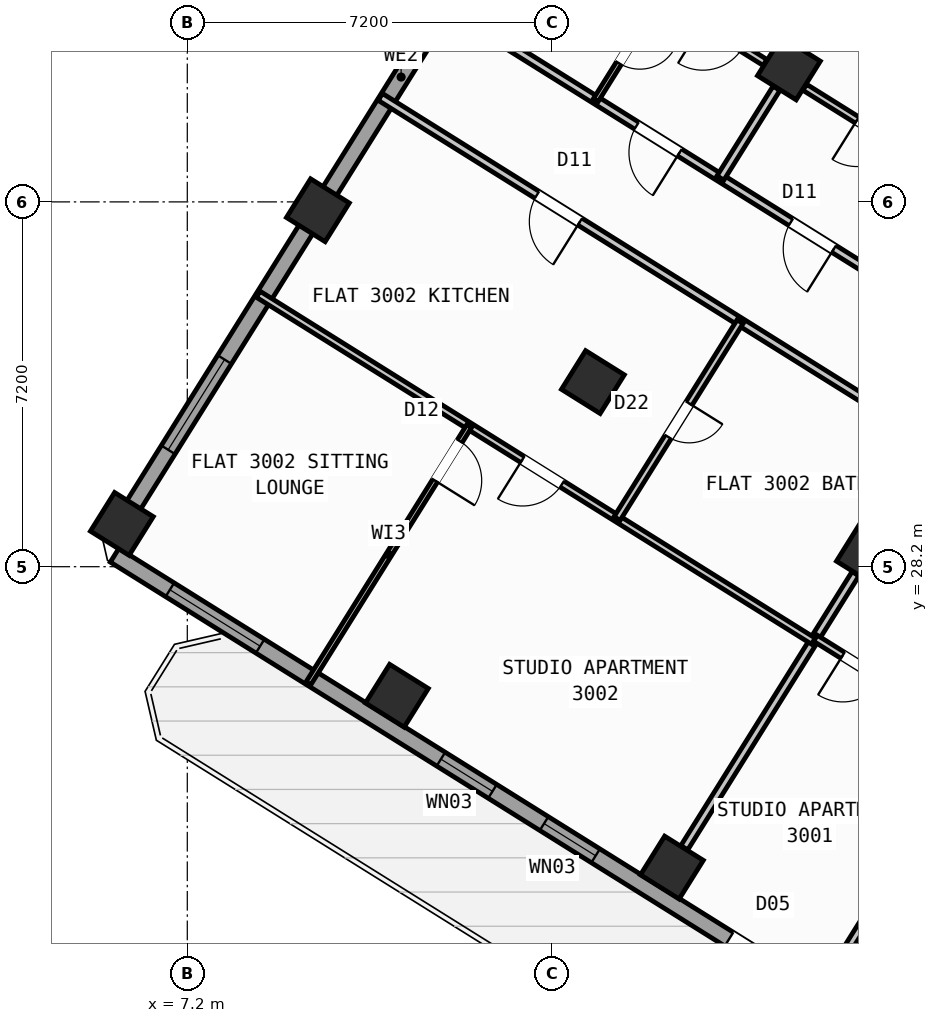
"""IFC4 building model, lengths in metres.
Left out: names, types, materials, properties, quantities, classifications, styles, units other than length and angle.
Written with IfcOpenShell. Run it as: python <this file> out.ifc"""

import sys

from ifc_helpers import new_model, si_unit, direction, frame, frame_2d, origin, origin_2d, place, context, subcontext, project, spatial, rectangle, hollow_rectangle, extrude, source, transform, mapped, element, fill, save


model = new_model("IFC4")
c1 = context("Model", 3, precision=1e-05, world=origin(), true_north=direction((0.0, 1.0)))
c2 = subcontext(c1, "Body", "Model", "MODEL_VIEW")
j1 = project(units=[si_unit("LENGTHUNIT", "METRE"), si_unit("PLANEANGLEUNIT", "RADIAN")], contexts=[c1])
p1 = place(None, origin())
s1 = spatial("IfcSite", under=j1, at=p1, CompositionType="ELEMENT")
p2 = place(p1, origin())
s2 = spatial("IfcBuilding", under=s1, at=p2, CompositionType="ELEMENT")
p3 = place(p2, frame((0.0, 0.0, 119.7)))
s3 = spatial("IfcBuildingStorey", under=s2, at=p3, CompositionType="ELEMENT", Elevation=119.7)
m1 = source(origin(), c2, "Body", "SweptSolid", [
    extrude(hollow_rectangle(XDim=0.9, YDim=0.9, WallThickness=0.036, at=origin_2d()), origin(), (0.0, 0.0, 1.0), 3.6),
])
for number, where, z_axis, x_axis in (
    (1, (20.632, 28.452, 0.0), (0.0, 0.0, 1.0), (-0.848, 0.53, 0.0)),
    (2, (16.764, 22.261, 0.0), (0.0, 0.0, 1.0), (-0.848, 0.53, 0.0)),
    (3, (19.073, 38.034, 0.0), (0.0, 0.0, 1.0), (-0.848, 0.53, 0.0)),
    (4, (15.205, 31.844, 0.0), (0.0, 0.0, 1.0), (-0.848, 0.53, 0.0)),
    (5, (11.336, 25.653, 0.0), (0.0, 0.0, 1.0), (-0.848, 0.53, 0.0)),
    (6, (9.777, 35.235, 0.0), (0.0, 0.0, 1.0), (-0.848, 0.53, 0.0)),
    (7, (5.909, 29.044, 0.0), (0.0, 0.0, 1.0), (-0.848, 0.53, 0.0)),
):
    element("IfcColumn", number, at=place(p3, frame(where, z_axis=z_axis, x_axis=x_axis)), inside=s3, PredefinedType="COLUMN", context=c2, shape_type="MappedRepresentation", body=[
        mapped(m1, transform((0.0, 0.0, 0.0), scale=1.0)),
    ])
p4 = place(p3, frame((31.76, 12.183, 0.0), z_axis=(0.0, 0.0, 1.0), x_axis=(-0.848047074256, 0.529920899612, 0.0)))
e8 = element("IfcWall", 8, at=p4, inside=s3, PredefinedType="STANDARD", context=c2, shape_type="SweptSolid", body=[
    extrude(rectangle(XDim=30.652, YDim=0.32, at=frame_2d((15.326, 0.0))), origin(), (0.0, 0.0, 1.0), 3.35),
])
p5 = place(p4, frame((15.153, 0.0, 0.0)))
e9 = element("IfcOpeningElement", 9, at=p5, cuts=e8, PredefinedType="OPENING", context=c2, shape_type="SweptSolid", body=[
    extrude(rectangle(XDim=1.2, YDim=2.15, at=frame_2d((0.6, 1.075))), frame((0.0, 0.17, 0.0), z_axis=(0.0, -1.0, 0.0), x_axis=(1.0, 0.0, 0.0)), (0.0, 0.0, 1.0), 0.34),
])
p6 = place(p4, frame((2.002, 0.0, 0.8)))
e10 = element("IfcOpeningElement", 10, at=p6, cuts=e8, PredefinedType="OPENING", context=c2, shape_type="SweptSolid", body=[
    extrude(rectangle(XDim=2.1, YDim=1.55, at=frame_2d((1.05, 0.775))), frame((0.0, 0.17, 0.0), z_axis=(0.0, -1.0, 0.0), x_axis=(1.0, 0.0, 0.0)), (0.0, 0.0, 1.0), 0.34),
])
p7 = place(p4, frame((7.206, 0.0, 0.8)))
e11 = element("IfcOpeningElement", 11, at=p7, cuts=e8, PredefinedType="OPENING", context=c2, shape_type="SweptSolid", body=[
    extrude(rectangle(XDim=2.1, YDim=1.55, at=frame_2d((1.05, 0.775))), frame((0.0, 0.17, 0.0), z_axis=(0.0, -1.0, 0.0), x_axis=(1.0, 0.0, 0.0)), (0.0, 0.0, 1.0), 0.34),
])
p8 = place(p4, frame((12.648, 0.0, 1.0)))
e12 = element("IfcOpeningElement", 12, at=p8, cuts=e8, PredefinedType="OPENING", context=c2, shape_type="SweptSolid", body=[
    extrude(rectangle(XDim=0.9, YDim=1.25, at=frame_2d((0.45, 0.625))), frame((0.0, 0.17, 0.0), z_axis=(0.0, -1.0, 0.0), x_axis=(1.0, 0.0, 0.0)), (0.0, 0.0, 1.0), 0.34),
])
p9 = place(p4, frame((19.458, 0.0, 0.95)))
e13 = element("IfcOpeningElement", 13, at=p9, cuts=e8, PredefinedType="OPENING", context=c2, shape_type="SweptSolid", body=[
    extrude(rectangle(XDim=1.2, YDim=1.4, at=frame_2d((0.6, 0.7))), frame((0.0, 0.17, 0.0), z_axis=(0.0, -1.0, 0.0), x_axis=(1.0, 0.0, 0.0)), (0.0, 0.0, 1.0), 0.34),
])
p10 = place(p4, frame((21.858, 0.0, 0.95)))
e14 = element("IfcOpeningElement", 14, at=p10, cuts=e8, PredefinedType="OPENING", context=c2, shape_type="SweptSolid", body=[
    extrude(rectangle(XDim=1.2, YDim=1.4, at=frame_2d((0.6, 0.7))), frame((0.0, 0.17, 0.0), z_axis=(0.0, -1.0, 0.0), x_axis=(1.0, 0.0, 0.0)), (0.0, 0.0, 1.0), 0.34),
])
p11 = place(p4, frame((27.266, 0.0, 0.8)))
e15 = element("IfcOpeningElement", 15, at=p11, cuts=e8, PredefinedType="OPENING", context=c2, shape_type="SweptSolid", body=[
    extrude(rectangle(XDim=2.1, YDim=1.55, at=frame_2d((1.05, 0.775))), frame((0.0, 0.17, 0.0), z_axis=(0.0, -1.0, 0.0), x_axis=(1.0, 0.0, 0.0)), (0.0, 0.0, 1.0), 0.34),
])
p12 = place(p3, frame((5.7, 28.71, 0.0), z_axis=(0.0, 0.0, 1.0), x_axis=(0.529923711467, 0.8480453172, 0.0)))
e16 = element("IfcWall", 16, at=p12, inside=s3, PredefinedType="STANDARD", context=c2, shape_type="SweptSolid", body=[
    extrude(rectangle(XDim=21.587, YDim=0.32, at=frame_2d((10.794, 0.0))), origin(), (0.0, 0.0, 1.0), 2.775),
])
p13 = place(p12, frame((2.119, 0.0, 0.8)))
e17 = element("IfcOpeningElement", 17, at=p13, cuts=e16, PredefinedType="OPENING", context=c2, shape_type="SweptSolid", body=[
    extrude(rectangle(XDim=2.1, YDim=1.55, at=frame_2d((1.05, 0.775))), frame((0.0, 0.17, 0.0), z_axis=(0.0, -1.0, 0.0), x_axis=(1.0, 0.0, 0.0)), (0.0, 0.0, 1.0), 0.34),
])
p14 = place(p12, frame((17.256, 0.0, 0.85)))
e18 = element("IfcOpeningElement", 18, at=p14, cuts=e16, PredefinedType="OPENING", context=c2, shape_type="SweptSolid", body=[
    extrude(rectangle(XDim=1.8, YDim=1.5, at=frame_2d((0.9, 0.75))), frame((0.0, 0.17, 0.0), z_axis=(0.0, -1.0, 0.0), x_axis=(1.0, 0.0, 0.0)), (0.0, 0.0, 1.0), 0.34),
])
p15 = place(p3, frame((17.424, 47.083, 0.0), z_axis=(0.0, 0.0, 1.0), x_axis=(0.848049927979, -0.529916332693, 0.0)))
e19 = element("IfcWall", 19, at=p15, inside=s3, PredefinedType="STANDARD", context=c2, shape_type="SweptSolid", body=[
    extrude(rectangle(XDim=29.223, YDim=0.32, at=frame_2d((14.612, 0.0))), origin(), (0.0, 0.0, 1.0), 3.35),
])
p16 = place(p15, frame((8.839, 0.0, 0.0)))
e20 = element("IfcOpeningElement", 20, at=p16, cuts=e19, PredefinedType="OPENING", context=c2, shape_type="SweptSolid", body=[
    extrude(rectangle(XDim=1.05, YDim=2.15, at=frame_2d((0.525, 1.075))), frame((0.0, 0.17, 0.0), z_axis=(0.0, -1.0, 0.0), x_axis=(1.0, 0.0, 0.0)), (0.0, 0.0, 1.0), 0.34),
])
p17 = place(p15, frame((0.719, 0.0, 0.85)))
e21 = element("IfcOpeningElement", 21, at=p17, cuts=e19, PredefinedType="OPENING", context=c2, shape_type="SweptSolid", body=[
    extrude(rectangle(XDim=1.8, YDim=1.5, at=frame_2d((0.9, 0.75))), frame((0.0, 0.17, 0.0), z_axis=(0.0, -1.0, 0.0), x_axis=(1.0, 0.0, 0.0)), (0.0, 0.0, 1.0), 0.34),
])
p18 = place(p15, frame((3.981, 0.0, 0.85)))
e22 = element("IfcOpeningElement", 22, at=p18, cuts=e19, PredefinedType="OPENING", context=c2, shape_type="SweptSolid", body=[
    extrude(rectangle(XDim=1.5, YDim=1.5, at=frame_2d((0.75, 0.75))), frame((0.0, 0.17, 0.0), z_axis=(0.0, -1.0, 0.0), x_axis=(1.0, 0.0, 0.0)), (0.0, 0.0, 1.0), 0.34),
])
p19 = place(p15, frame((7.021, 0.0, 0.95)))
e23 = element("IfcOpeningElement", 23, at=p19, cuts=e19, PredefinedType="OPENING", context=c2, shape_type="SweptSolid", body=[
    extrude(rectangle(XDim=1.2, YDim=1.4, at=frame_2d((0.6, 0.7))), frame((0.0, 0.17, 0.0), z_axis=(0.0, -1.0, 0.0), x_axis=(1.0, 0.0, 0.0)), (0.0, 0.0, 1.0), 0.34),
])
p20 = place(p15, frame((14.471, 0.0, 0.95)))
e24 = element("IfcOpeningElement", 24, at=p20, cuts=e19, PredefinedType="OPENING", context=c2, shape_type="SweptSolid", body=[
    extrude(rectangle(XDim=1.2, YDim=1.4, at=frame_2d((0.6, 0.7))), frame((0.0, 0.17, 0.0), z_axis=(0.0, -1.0, 0.0), x_axis=(1.0, 0.0, 0.0)), (0.0, 0.0, 1.0), 0.34),
])
p21 = place(p15, frame((17.254, 0.0, 1.0)))
e25 = element("IfcOpeningElement", 25, at=p21, cuts=e19, PredefinedType="OPENING", context=c2, shape_type="SweptSolid", body=[
    extrude(rectangle(XDim=0.9, YDim=1.25, at=frame_2d((0.45, 0.625))), frame((0.0, 0.17, 0.0), z_axis=(0.0, -1.0, 0.0), x_axis=(1.0, 0.0, 0.0)), (0.0, 0.0, 1.0), 0.34),
])
p22 = place(p15, frame((20.764, 0.0, 0.8)))
e26 = element("IfcOpeningElement", 26, at=p22, cuts=e19, PredefinedType="OPENING", context=c2, shape_type="SweptSolid", body=[
    extrude(rectangle(XDim=2.1, YDim=1.55, at=frame_2d((1.05, 0.775))), frame((0.0, 0.17, 0.0), z_axis=(0.0, -1.0, 0.0), x_axis=(1.0, 0.0, 0.0)), (0.0, 0.0, 1.0), 0.34),
])
p23 = place(p15, frame((25.403, 0.0, 0.8)))
e27 = element("IfcOpeningElement", 27, at=p23, cuts=e19, PredefinedType="OPENING", context=c2, shape_type="SweptSolid", body=[
    extrude(rectangle(XDim=2.1, YDim=1.55, at=frame_2d((1.05, 0.775))), frame((0.0, 0.17, 0.0), z_axis=(0.0, -1.0, 0.0), x_axis=(1.0, 0.0, 0.0)), (0.0, 0.0, 1.0), 0.34),
])
p24 = place(p3, frame((25.198, 28.606, 0.0), z_axis=(0.0, 0.0, 1.0), x_axis=(-0.529926497642, -0.848043576178, 0.0)))
e28 = element("IfcWall", 28, at=p24, inside=s3, PredefinedType="PARTITIONING", context=c2, shape_type="SweptSolid", body=[
    extrude(rectangle(XDim=10.3, YDim=0.16, at=frame_2d((5.15, 0.0))), origin(), (0.0, 0.0, 1.0), 3.34),
])
p25 = place(p3, frame((26.363, 30.472, 0.0), z_axis=(0.0, 0.0, 1.0), x_axis=(-0.848052408131, 0.529912363569, 0.0)))
e29 = element("IfcWall", 29, at=p25, inside=s3, PredefinedType="PARTITIONING", context=c2, shape_type="SweptSolid", body=[
    extrude(rectangle(XDim=16.73, YDim=0.16, at=frame_2d((8.365, 0.0))), origin(), (0.0, 0.0, 1.0), 3.34),
])
p26 = place(p25, frame((7.55, 0.0, 0.0)))
e30 = element("IfcOpeningElement", 30, at=p26, cuts=e29, PredefinedType="OPENING", context=c2, shape_type="SweptSolid", body=[
    extrude(rectangle(XDim=1.0, YDim=2.1, at=frame_2d((0.5, 1.05))), frame((0.0, 0.09, 0.0), z_axis=(0.0, -1.0, 0.0), x_axis=(1.0, 0.0, 0.0)), (0.0, 0.0, 1.0), 0.18),
])
p27 = place(p25, frame((11.14, 0.0, 0.0)))
e31 = element("IfcOpeningElement", 31, at=p27, cuts=e29, PredefinedType="OPENING", context=c2, shape_type="SweptSolid", body=[
    extrude(rectangle(XDim=1.0, YDim=2.1, at=frame_2d((0.5, 1.05))), frame((0.0, 0.09, 0.0), z_axis=(0.0, -1.0, 0.0), x_axis=(1.0, 0.0, 0.0)), (0.0, 0.0, 1.0), 0.18),
])
p28 = place(p3, frame((25.198, 28.606, 0.0), z_axis=(0.0, 0.0, 1.0), x_axis=(-0.848052408131, 0.529912363569, 0.0)))
e32 = element("IfcWall", 32, at=p28, inside=s3, PredefinedType="PARTITIONING", context=c2, shape_type="SweptSolid", body=[
    extrude(rectangle(XDim=16.73, YDim=0.16, at=frame_2d((8.365, 0.0))), origin(), (0.0, 0.0, 1.0), 3.34),
])
p29 = place(p28, frame((2.22, 0.0, 0.0)))
e33 = element("IfcOpeningElement", 33, at=p29, cuts=e32, PredefinedType="OPENING", context=c2, shape_type="SweptSolid", body=[
    extrude(rectangle(XDim=0.86, YDim=2.05, at=frame_2d((0.43, 1.025))), frame((0.0, 0.09, 0.0), z_axis=(0.0, -1.0, 0.0), x_axis=(1.0, 0.0, 0.0)), (0.0, 0.0, 1.0), 0.18),
])
p30 = place(p28, frame((12.084, 0.0, 0.0)))
e34 = element("IfcOpeningElement", 34, at=p30, cuts=e32, PredefinedType="OPENING", context=c2, shape_type="SweptSolid", body=[
    extrude(rectangle(XDim=1.0, YDim=2.1, at=frame_2d((0.5, 1.05))), frame((0.0, 0.09, 0.0), z_axis=(0.0, -1.0, 0.0), x_axis=(1.0, 0.0, 0.0)), (0.0, 0.0, 1.0), 0.18),
])
p31 = place(p3, frame((20.387, 28.06, 0.0), z_axis=(0.0, 0.0, 1.0), x_axis=(-0.529902564924, -0.848058530814, 0.0)))
e35 = element("IfcWall", 35, at=p31, inside=s3, PredefinedType="PARTITIONING", context=c2, shape_type="SweptSolid", body=[
    extrude(rectangle(XDim=6.376, YDim=0.16, at=frame_2d((3.188, 0.0))), origin(), (0.0, 0.0, 1.0), 2.775),
])
p32 = place(p3, frame((22.807, 24.781, 0.0), z_axis=(0.0, 0.0, 1.0), x_axis=(-0.84803087207, 0.529946827537, 0.0)))
e36 = element("IfcWall", 36, at=p32, inside=s3, PredefinedType="PLUMBINGWALL", context=c2, shape_type="SweptSolid", body=[
    extrude(rectangle(XDim=3.79, YDim=0.14, at=frame_2d((1.895, 0.0))), origin(), (0.0, 0.0, 1.0), 3.34),
])
p33 = place(p32, frame((2.23, 0.0, 0.0)))
e37 = element("IfcOpeningElement", 37, at=p33, cuts=e36, PredefinedType="OPENING", context=c2, shape_type="SweptSolid", body=[
    extrude(rectangle(XDim=0.92, YDim=2.08, at=frame_2d((0.46, 1.04))), frame((0.0, 0.08, 0.0), z_axis=(0.0, -1.0, 0.0), x_axis=(1.0, 0.0, 0.0)), (0.0, 0.0, 1.0), 0.16),
])
p34 = place(p3, frame((19.556, 26.73, 0.0), z_axis=(0.0, 0.0, 1.0), x_axis=(-0.848043949058, 0.52992590092, 0.0)))
e38 = element("IfcWall", 38, at=p34, inside=s3, PredefinedType="PLUMBINGWALL", context=c2, shape_type="SweptSolid", body=[
    extrude(rectangle(XDim=12.92, YDim=0.14, at=frame_2d((6.46, 0.0))), origin(), (0.0, 0.0, 1.0), 3.34),
])
p35 = place(p34, frame((5.849, 0.0, 0.0)))
e39 = element("IfcOpeningElement", 39, at=p35, cuts=e38, PredefinedType="OPENING", context=c2, shape_type="SweptSolid", body=[
    extrude(rectangle(XDim=0.92, YDim=2.08, at=frame_2d((0.46, 1.04))), frame((0.0, 0.08, 0.0), z_axis=(0.0, -1.0, 0.0), x_axis=(1.0, 0.0, 0.0)), (0.0, 0.0, 1.0), 0.16),
])
p36 = place(p3, frame((18.109, 33.035, 0.0), z_axis=(0.0, 0.0, 1.0), x_axis=(-0.529893526057, -0.848064178611, 0.0)))
e40 = element("IfcWall", 40, at=p36, inside=s3, PredefinedType="PLUMBINGWALL", context=c2, shape_type="SweptSolid", body=[
    extrude(rectangle(XDim=4.58, YDim=0.14, at=frame_2d((2.29, 0.0))), origin(), (0.0, 0.0, 1.0), 3.34),
])
p37 = place(p36, frame((1.9, 0.0, 0.0)))
e41 = element("IfcOpeningElement", 41, at=p37, cuts=e40, PredefinedType="OPENING", context=c2, shape_type="SweptSolid", body=[
    extrude(rectangle(XDim=0.78, YDim=2.05, at=frame_2d((0.39, 1.025))), frame((0.0, 0.08, 0.0), z_axis=(0.0, -1.0, 0.0), x_axis=(1.0, 0.0, 0.0)), (0.0, 0.0, 1.0), 0.16),
])
p38 = place(p3, frame((12.763, 30.975, 0.0), z_axis=(0.0, 0.0, 1.0), x_axis=(-0.529947646893, -0.848030360042, 0.0)))
e42 = element("IfcWall", 42, at=p38, inside=s3, PredefinedType="PARTITIONING", context=c2, shape_type="SweptSolid", body=[
    extrude(rectangle(XDim=5.99, YDim=0.11, at=frame_2d((2.995, 0.0))), origin(), (0.0, 0.0, 1.0), 3.34),
])
p39 = place(p38, frame((0.35, 0.0, 0.0)))
e43 = element("IfcOpeningElement", 43, at=p39, cuts=e42, PredefinedType="OPENING", context=c2, shape_type="SweptSolid", body=[
    extrude(rectangle(XDim=0.92, YDim=2.08, at=frame_2d((0.46, 1.04))), frame((0.0, 0.065, 0.0), z_axis=(0.0, -1.0, 0.0), x_axis=(1.0, 0.0, 0.0)), (0.0, 0.0, 1.0), 0.13),
])
p40 = place(p3, frame((18.828, 37.643, 0.0), z_axis=(0.0, 0.0, 1.0), x_axis=(-0.529904345651, -0.848057418139, 0.0)))
e44 = element("IfcWall", 44, at=p40, inside=s3, PredefinedType="PARTITIONING", context=c2, shape_type="SweptSolid", body=[
    extrude(rectangle(XDim=2.088, YDim=0.16, at=frame_2d((1.044, 0.0))), origin(), (0.0, 0.0, 1.0), 2.775),
])
p41 = place(p3, frame((22.623, 35.639, 0.0), z_axis=(0.0, 0.0, 1.0), x_axis=(-0.8480485946, 0.529918466555, 0.0)))
e45 = element("IfcWall", 45, at=p41, inside=s3, PredefinedType="PLUMBINGWALL", context=c2, shape_type="SweptSolid", body=[
    extrude(rectangle(XDim=3.818, YDim=0.14, at=frame_2d((1.909, 0.0))), origin(), (0.0, 0.0, 1.0), 2.775),
])
p42 = place(p41, frame((1.68, 0.0, 0.0)))
e46 = element("IfcOpeningElement", 46, at=p42, cuts=e45, PredefinedType="OPENING", context=c2, shape_type="SweptSolid", body=[
    extrude(rectangle(XDim=0.92, YDim=2.08, at=frame_2d((0.46, 1.04))), frame((0.0, 0.08, 0.0), z_axis=(0.0, -1.0, 0.0), x_axis=(1.0, 0.0, 0.0)), (0.0, 0.0, 1.0), 0.16),
])
p43 = place(p3, frame((20.281, 45.44, 0.0), z_axis=(0.0, 0.0, 1.0), x_axis=(-0.529917830441, -0.848048992088, 0.0)))
e47 = element("IfcWall", 47, at=p43, inside=s3, PredefinedType="PARTITIONING", context=c2, shape_type="SweptSolid", body=[
    extrude(rectangle(XDim=9.47, YDim=0.11, at=frame_2d((4.735, 0.0))), origin(), (0.0, 0.0, 1.0), 3.34),
])
p44 = place(p43, frame((7.83, 0.0, 0.0)))
e48 = element("IfcOpeningElement", 48, at=p44, cuts=e47, PredefinedType="OPENING", context=c2, shape_type="SweptSolid", body=[
    extrude(rectangle(XDim=0.78, YDim=2.05, at=frame_2d((0.39, 1.025))), frame((0.0, 0.065, 0.0), z_axis=(0.0, -1.0, 0.0), x_axis=(1.0, 0.0, 0.0)), (0.0, 0.0, 1.0), 0.13),
])
p45 = place(p43, frame((3.075, 0.0, 0.0)))
e49 = element("IfcOpeningElement", 49, at=p45, cuts=e47, PredefinedType="OPENING", context=c2, shape_type="SweptSolid", body=[
    extrude(rectangle(XDim=0.92, YDim=2.08, at=frame_2d((0.46, 1.04))), frame((0.0, 0.065, 0.0), z_axis=(0.0, -1.0, 0.0), x_axis=(1.0, 0.0, 0.0)), (0.0, 0.0, 1.0), 0.13),
])
p46 = place(p3, frame((18.602, 38.152, 0.0), z_axis=(0.0, 0.0, 1.0), x_axis=(-0.848020807548, 0.529962932634, 0.0)))
e50 = element("IfcWall", 50, at=p46, inside=s3, PredefinedType="PLUMBINGWALL", context=c2, shape_type="SweptSolid", body=[
    extrude(rectangle(XDim=2.438, YDim=0.14, at=frame_2d((1.219, 0.0))), origin(), (0.0, 0.0, 1.0), 2.775),
])
p47 = place(p46, frame((0.528, 0.0, 0.0)))
e51 = element("IfcOpeningElement", 51, at=p47, cuts=e50, PredefinedType="OPENING", context=c2, shape_type="SweptSolid", body=[
    extrude(rectangle(XDim=0.92, YDim=2.08, at=frame_2d((0.46, 1.04))), frame((0.0, 0.08, 0.0), z_axis=(0.0, -1.0, 0.0), x_axis=(1.0, 0.0, 0.0)), (0.0, 0.0, 1.0), 0.16),
])
m2 = source(origin(), c2, "Body", "SweptSolid", [
    extrude(rectangle(XDim=1.2, YDim=2.15, at=frame_2d((0.6, 1.075))), frame((0.0, 0.025, 0.0), z_axis=(0.0, -1.0, 0.0), x_axis=(1.0, 0.0, 0.0)), (0.0, 0.0, 1.0), 0.05),
])
p48 = place(p5, origin())
e52 = element("IfcDoor", 52, at=p48, inside=s3, OperationType="SINGLE_SWING_LEFT", PredefinedType="DOOR", context=c2, shape_type="MappedRepresentation", body=[
    mapped(m2, transform((0.0, 0.0, 0.0), scale=1.0)),
])
fill(e9, e52)
m3 = source(origin(), c2, "Body", "SweptSolid", [
    extrude(rectangle(XDim=1.2, YDim=1.4, at=frame_2d((0.6, 0.7))), frame((0.0, 0.03, 0.0), z_axis=(0.0, -1.0, 0.0), x_axis=(1.0, 0.0, 0.0)), (0.0, 0.0, 1.0), 0.06),
])
p49 = place(p9, origin())
e53 = element("IfcWindow", 53, at=p49, inside=s3, PartitioningType="SINGLE_PANEL", PredefinedType="WINDOW", context=c2, shape_type="MappedRepresentation", body=[
    mapped(m3, transform((0.0, 0.0, 0.0), scale=1.0)),
])
fill(e13, e53)
p50 = place(p10, origin())
e54 = element("IfcWindow", 54, at=p50, inside=s3, PartitioningType="SINGLE_PANEL", PredefinedType="WINDOW", context=c2, shape_type="MappedRepresentation", body=[
    mapped(m3, transform((0.0, 0.0, 0.0), scale=1.0)),
])
fill(e14, e54)
m4 = source(origin(), c2, "Body", "SweptSolid", [
    extrude(rectangle(XDim=2.1, YDim=1.55, at=frame_2d((1.05, 0.775))), frame((0.0, 0.03, 0.0), z_axis=(0.0, -1.0, 0.0), x_axis=(1.0, 0.0, 0.0)), (0.0, 0.0, 1.0), 0.06),
])
p51 = place(p11, origin())
e55 = element("IfcWindow", 55, at=p51, inside=s3, PartitioningType="SINGLE_PANEL", PredefinedType="WINDOW", context=c2, shape_type="MappedRepresentation", body=[
    mapped(m4, transform((0.0, 0.0, 0.0), scale=1.0)),
])
fill(e15, e55)
p52 = place(p13, origin())
e56 = element("IfcWindow", 56, at=p52, inside=s3, PartitioningType="SINGLE_PANEL", PredefinedType="WINDOW", context=c2, shape_type="MappedRepresentation", body=[
    mapped(m4, transform((0.0, 0.0, 0.0), scale=1.0)),
])
fill(e17, e56)
m5 = source(origin(), c2, "Body", "SweptSolid", [
    extrude(rectangle(XDim=0.92, YDim=2.08, at=frame_2d((0.46, 1.04))), frame((0.0, 0.025, 0.0), z_axis=(0.0, -1.0, 0.0), x_axis=(1.0, 0.0, 0.0)), (0.0, 0.0, 1.0), 0.05),
])
p53 = place(p33, origin())
e57 = element("IfcDoor", 57, at=p53, inside=s3, OperationType="SINGLE_SWING_RIGHT", PredefinedType="DOOR", context=c2, shape_type="MappedRepresentation", body=[
    mapped(m5, transform((0.0, 0.0, 0.0), scale=1.0)),
])
fill(e37, e57)
p54 = place(p39, origin())
e58 = element("IfcDoor", 58, at=p54, inside=s3, OperationType="SINGLE_SWING_RIGHT", PredefinedType="DOOR", context=c2, shape_type="MappedRepresentation", body=[
    mapped(m5, transform((0.0, 0.0, 0.0), scale=1.0)),
])
fill(e43, e58)
m6 = source(origin(), c2, "Body", "SweptSolid", [
    extrude(rectangle(XDim=1.0, YDim=2.1, at=frame_2d((0.5, 1.05))), frame((0.0, 0.025, 0.0), z_axis=(0.0, -1.0, 0.0), x_axis=(1.0, 0.0, 0.0)), (0.0, 0.0, 1.0), 0.05),
])
p55 = place(p30, origin())
e59 = element("IfcDoor", 59, at=p55, inside=s3, OperationType="SINGLE_SWING_LEFT", PredefinedType="DOOR", context=c2, shape_type="MappedRepresentation", body=[
    mapped(m6, transform((0.0, 0.0, 0.0), scale=1.0)),
])
fill(e34, e59)
p56 = place(p35, origin())
e60 = element("IfcDoor", 60, at=p56, inside=s3, OperationType="SINGLE_SWING_RIGHT", PredefinedType="DOOR", context=c2, shape_type="MappedRepresentation", body=[
    mapped(m5, transform((0.0, 0.0, 0.0), scale=1.0)),
])
fill(e39, e60)
m7 = source(origin(), c2, "Body", "SweptSolid", [
    extrude(rectangle(XDim=0.78, YDim=2.05, at=frame_2d((0.39, 1.025))), frame((0.0, 0.025, 0.0), z_axis=(0.0, -1.0, 0.0), x_axis=(1.0, 0.0, 0.0)), (0.0, 0.0, 1.0), 0.05),
])
p57 = place(p37, origin())
e61 = element("IfcDoor", 61, at=p57, inside=s3, OperationType="SINGLE_SWING_LEFT", PredefinedType="DOOR", context=c2, shape_type="MappedRepresentation", body=[
    mapped(m7, transform((0.0, 0.0, 0.0), scale=1.0)),
])
fill(e41, e61)
p58 = place(p26, origin())
e62 = element("IfcDoor", 62, at=p58, inside=s3, OperationType="SINGLE_SWING_LEFT", PredefinedType="DOOR", context=c2, shape_type="MappedRepresentation", body=[
    mapped(m6, transform((0.0, 0.0, 0.0), scale=1.0)),
])
fill(e30, e62)
p59 = place(p42, origin())
e63 = element("IfcDoor", 63, at=p59, inside=s3, OperationType="SINGLE_SWING_RIGHT", PredefinedType="DOOR", context=c2, shape_type="MappedRepresentation", body=[
    mapped(m5, transform((0.0, 0.0, 0.0), scale=1.0)),
])
fill(e46, e63)
p60 = place(p27, origin())
e64 = element("IfcDoor", 64, at=p60, inside=s3, OperationType="SINGLE_SWING_LEFT", PredefinedType="DOOR", context=c2, shape_type="MappedRepresentation", body=[
    mapped(m6, transform((0.0, 0.0, 0.0), scale=1.0)),
])
fill(e31, e64)
p61 = place(p44, origin())
e65 = element("IfcDoor", 65, at=p61, inside=s3, OperationType="SINGLE_SWING_LEFT", PredefinedType="DOOR", context=c2, shape_type="MappedRepresentation", body=[
    mapped(m7, transform((0.0, 0.0, 0.0), scale=1.0)),
])
fill(e48, e65)
save(model, sys.argv[1])
